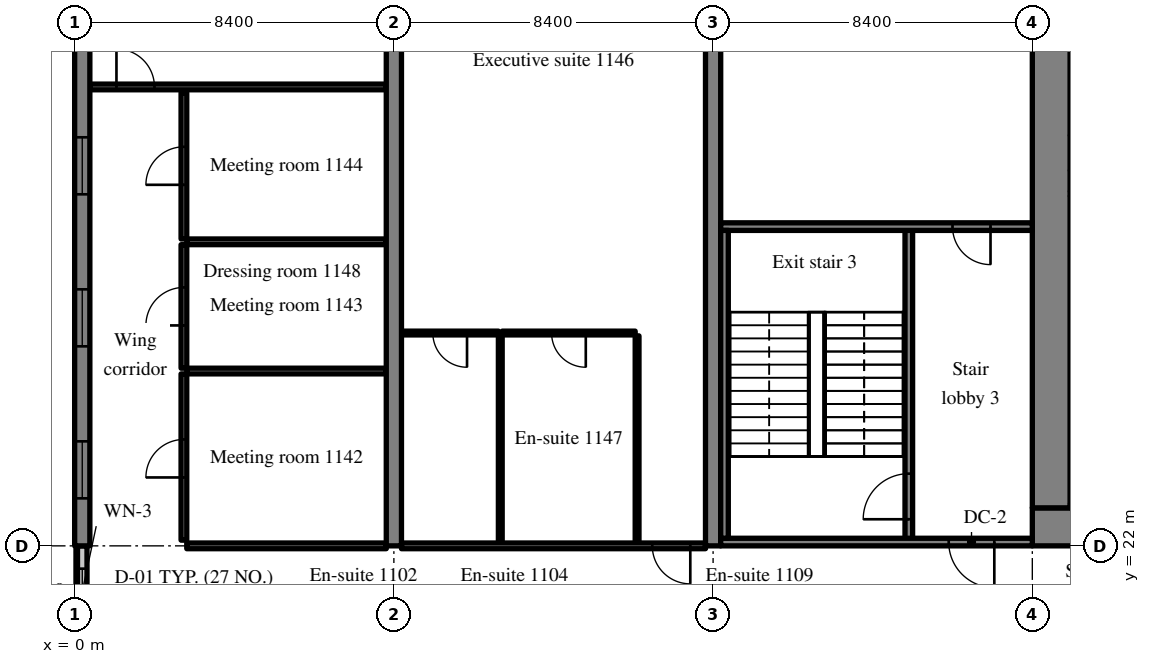
"""IFC4 building model, lengths in metres.
Left out: names, types, materials, properties, quantities, classifications, styles, units other than length and angle.
Written with IfcOpenShell. Run it as: python <this file> out.ifc"""

import sys

from ifc_helpers import new_model, si_unit, direction, frame, frame_2d, origin, place, context, subcontext, project, spatial, rectangle, extrude, source, transform, mapped, element, fill, save


model = new_model("IFC4")
c1 = context("Model", 3, precision=1e-05, world=origin(), true_north=direction((0.0, 1.0)))
c2 = subcontext(c1, "Body", "Model", "MODEL_VIEW")
j1 = project(units=[si_unit("LENGTHUNIT", "METRE"), si_unit("PLANEANGLEUNIT", "RADIAN")], contexts=[c1])
p1 = place(None, origin())
s1 = spatial("IfcSite", under=j1, at=p1, CompositionType="ELEMENT")
p2 = place(p1, origin())
s2 = spatial("IfcBuilding", under=s1, at=p2, CompositionType="ELEMENT")
p3 = place(p2, frame((0.0, 0.0, 50.6)))
s3 = spatial("IfcBuildingStorey", under=s2, at=p3, CompositionType="ELEMENT", Elevation=50.6)
m1 = source(origin(), c2, "Body", "SweptSolid", [
    extrude(rectangle(XDim=50.4, YDim=1.0, at=frame_2d((25.2, 0.0))), origin(), (0.0, 0.0, 1.0), 3.52),
])
p4 = place(p3, frame((25.2, 22.5, 0.0), z_axis=(0.0, 0.0, 1.0), x_axis=(1.0, 0.0, 0.0)))
e1 = element("IfcWall", 1, at=p4, inside=s3, PredefinedType="SHEAR", context=c2, shape_type="MappedRepresentation", body=[
    mapped(m1, transform((0.0, 0.0, 0.0), scale=1.0)),
])
m2 = source(origin(), c2, "Body", "SweptSolid", [
    extrude(rectangle(XDim=1.8, YDim=2.1, at=frame_2d((0.9, 1.05))), frame((0.0, 0.51, 0.0), z_axis=(0.0, -1.0, 0.0), x_axis=(1.0, 0.0, 0.0)), (0.0, 0.0, 1.0), 1.02),
])
p5 = place(p4, frame((15.9, 0.0, 0.0)))
e2 = element("IfcOpeningElement", 2, at=p5, cuts=e1, PredefinedType="OPENING", context=c2, shape_type="MappedRepresentation", body=[
    mapped(m2, transform((0.0, 0.0, 0.0), scale=1.0)),
])
m3 = source(origin(), c2, "Body", "SweptSolid", [
    extrude(rectangle(XDim=1.2, YDim=2.1, at=frame_2d((0.6, 1.05))), frame((0.0, 0.51, 0.0), z_axis=(0.0, -1.0, 0.0), x_axis=(1.0, 0.0, 0.0)), (0.0, 0.0, 1.0), 1.02),
])
p6 = place(p4, frame((26.987, 0.0, 0.0)))
e3 = element("IfcOpeningElement", 3, at=p6, cuts=e1, PredefinedType="OPENING", context=c2, shape_type="MappedRepresentation", body=[
    mapped(m3, transform((0.0, 0.0, 0.0), scale=1.0)),
])
m4 = source(origin(), c2, "Body", "SweptSolid", [
    extrude(rectangle(XDim=0.9, YDim=2.1, at=frame_2d((0.45, 1.05))), frame((0.0, 0.51, 0.0), z_axis=(0.0, -1.0, 0.0), x_axis=(1.0, 0.0, 0.0)), (0.0, 0.0, 1.0), 1.02),
])
p7 = place(p4, frame((33.75, 0.0, 0.0)))
e4 = element("IfcOpeningElement", 4, at=p7, cuts=e1, PredefinedType="OPENING", context=c2, shape_type="MappedRepresentation", body=[
    mapped(m4, transform((0.0, 0.0, 0.0), scale=1.0)),
])
p8 = place(p4, frame((30.75, 0.0, 0.0)))
e5 = element("IfcOpeningElement", 5, at=p8, cuts=e1, PredefinedType="OPENING", context=c2, shape_type="MappedRepresentation", body=[
    mapped(m4, transform((0.0, 0.0, 0.0), scale=1.0)),
])
p9 = place(p4, frame((38.262, 0.0, 0.0)))
e6 = element("IfcOpeningElement", 6, at=p9, cuts=e1, PredefinedType="OPENING", context=c2, shape_type="MappedRepresentation", body=[
    mapped(m4, transform((0.0, 0.0, 0.0), scale=1.0)),
])
p10 = place(p4, frame((6.438, 0.0, 0.0)))
e7 = element("IfcOpeningElement", 7, at=p10, cuts=e1, PredefinedType="OPENING", context=c2, shape_type="MappedRepresentation", body=[
    mapped(m3, transform((0.0, 0.0, 0.0), scale=1.0)),
])
p11 = place(p4, frame((47.725, 0.0, 0.0)))
e8 = element("IfcOpeningElement", 8, at=p11, cuts=e1, PredefinedType="OPENING", context=c2, shape_type="MappedRepresentation", body=[
    mapped(m3, transform((0.0, 0.0, 0.0), scale=1.0)),
])
m5 = source(origin(), c2, "Body", "SweptSolid", [
    extrude(rectangle(XDim=18.0, YDim=1.0, at=frame_2d((9.0, 0.0))), origin(), (0.0, 0.0, 1.0), 3.52),
])
p12 = place(p3, frame((25.7, 23.0, 0.0), z_axis=(0.0, 0.0, 1.0), x_axis=(0.0, 1.0, 0.0)))
e9 = element("IfcWall", 9, at=p12, inside=s3, PredefinedType="SHEAR", context=c2, shape_type="MappedRepresentation", body=[
    mapped(m5, transform((0.0, 0.0, 0.0), scale=1.0)),
])
m6 = source(origin(), c2, "Body", "SweptSolid", [
    extrude(rectangle(XDim=16.0, YDim=0.4, at=frame_2d((8.0, 0.0))), origin(), (0.0, 0.0, 1.0), 3.52),
])
p13 = place(p3, frame((0.2, 22.0, 0.0), z_axis=(0.0, 0.0, 1.0), x_axis=(0.0, 1.0, 0.0)))
e10 = element("IfcWall", 10, at=p13, inside=s3, PredefinedType="SHEAR", context=c2, shape_type="MappedRepresentation", body=[
    mapped(m6, transform((0.0, 0.0, 0.0), scale=1.0)),
])
m7 = source(origin(), c2, "Body", "SweptSolid", [
    extrude(rectangle(XDim=1.5, YDim=1.5, at=frame_2d((0.75, 0.75))), frame((0.0, 0.21, 0.0), z_axis=(0.0, -1.0, 0.0), x_axis=(1.0, 0.0, 0.0)), (0.0, 0.0, 1.0), 0.42),
])
p14 = place(p13, frame((1.25, 0.0, 0.9)))
e11 = element("IfcOpeningElement", 11, at=p14, cuts=e10, PredefinedType="OPENING", context=c2, shape_type="MappedRepresentation", body=[
    mapped(m7, transform((0.0, 0.0, 0.0), scale=1.0)),
])
p15 = place(p13, frame((5.25, 0.0, 0.9)))
e12 = element("IfcOpeningElement", 12, at=p15, cuts=e10, PredefinedType="OPENING", context=c2, shape_type="MappedRepresentation", body=[
    mapped(m7, transform((0.0, 0.0, 0.0), scale=1.0)),
])
p16 = place(p13, frame((9.25, 0.0, 0.9)))
e13 = element("IfcOpeningElement", 13, at=p16, cuts=e10, PredefinedType="OPENING", context=c2, shape_type="MappedRepresentation", body=[
    mapped(m7, transform((0.0, 0.0, 0.0), scale=1.0)),
])
p17 = place(p13, frame((13.25, 0.0, 0.9)))
e14 = element("IfcOpeningElement", 14, at=p17, cuts=e10, PredefinedType="OPENING", context=c2, shape_type="MappedRepresentation", body=[
    mapped(m7, transform((0.0, 0.0, 0.0), scale=1.0)),
])
m8 = source(origin(), c2, "Body", "SweptSolid", [
    extrude(rectangle(XDim=20.0, YDim=0.4, at=frame_2d((10.0, 0.0))), origin(), (0.0, 0.0, 1.0), 3.52),
])
for number, where, z_axis, x_axis in (
    (15, (8.4, 22.0, 0.0), (0.0, 0.0, 1.0), (0.0, 1.0, 0.0)),
    (16, (16.8, 22.0, 0.0), (0.0, 0.0, 1.0), (0.0, 1.0, 0.0)),
):
    element("IfcWall", number, at=place(p3, frame(where, z_axis=z_axis, x_axis=x_axis)), inside=s3, PredefinedType="SHEAR", context=c2, shape_type="MappedRepresentation", body=[
        mapped(m8, transform((0.0, 0.0, 0.0), scale=1.0)),
    ])
m9 = source(origin(), c2, "Body", "SweptSolid", [
    extrude(rectangle(XDim=2.4, YDim=0.25, at=frame_2d((1.2, 0.0))), origin(), (0.0, 0.0, 1.0), 2.62),
])
p18 = place(p3, frame((0.2, 19.6, 0.0), z_axis=(0.0, 0.0, 1.0), x_axis=(0.0, 1.0, 0.0)))
e17 = element("IfcWall", 17, at=p18, inside=s3, PredefinedType="SOLIDWALL", context=c2, shape_type="MappedRepresentation", body=[
    mapped(m9, transform((0.0, 0.0, 0.0), scale=1.0)),
])
m10 = source(origin(), c2, "Body", "SweptSolid", [
    extrude(rectangle(XDim=1.2, YDim=1.5, at=frame_2d((0.6, 0.75))), frame((0.0, 0.135, 0.0), z_axis=(0.0, -1.0, 0.0), x_axis=(1.0, 0.0, 0.0)), (0.0, 0.0, 1.0), 0.27),
])
p19 = place(p18, frame((0.6, 0.0, 0.9)))
e18 = element("IfcOpeningElement", 18, at=p19, cuts=e17, PredefinedType="OPENING", context=c2, shape_type="MappedRepresentation", body=[
    mapped(m10, transform((0.0, 0.0, 0.0), scale=1.0)),
])
m11 = source(origin(), c2, "Body", "SweptSolid", [
    extrude(rectangle(XDim=8.3, YDim=0.2, at=frame_2d((4.15, 0.0))), origin(), (0.0, 0.0, 1.0), 3.52),
])
p20 = place(p3, frame((21.95, 22.1, 0.0), z_axis=(0.0, 0.0, 1.0), x_axis=(0.0, 1.0, 0.0)))
e19 = element("IfcWall", 19, at=p20, inside=s3, PredefinedType="SOLIDWALL", context=c2, shape_type="MappedRepresentation", body=[
    mapped(m11, transform((0.0, 0.0, 0.0), scale=1.0)),
])
m12 = source(origin(), c2, "Body", "SweptSolid", [
    extrude(rectangle(XDim=1.2, YDim=2.1, at=frame_2d((0.6, 1.05))), frame((0.0, 0.11, 0.0), z_axis=(0.0, -1.0, 0.0), x_axis=(1.0, 0.0, 0.0)), (0.0, 0.0, 1.0), 0.22),
])
p21 = place(p20, frame((0.6, 0.0, 0.0)))
e20 = element("IfcOpeningElement", 20, at=p21, cuts=e19, PredefinedType="OPENING", context=c2, shape_type="MappedRepresentation", body=[
    mapped(m12, transform((0.0, 0.0, 0.0), scale=1.0)),
])
m13 = source(origin(), c2, "Body", "SweptSolid", [
    extrude(rectangle(XDim=8.2, YDim=0.2, at=frame_2d((4.1, 0.0))), origin(), (0.0, 0.0, 1.0), 3.52),
])
p22 = place(p3, frame((17.0, 22.1, 0.0), z_axis=(0.0, 0.0, 1.0), x_axis=(1.0, 0.0, 0.0)))
e21 = element("IfcWall", 21, at=p22, inside=s3, PredefinedType="SOLIDWALL", context=c2, shape_type="MappedRepresentation", body=[
    mapped(m13, transform((0.0, 0.0, 0.0), scale=1.0)),
])
p23 = place(p22, frame((6.0, 0.0, 0.0)))
e22 = element("IfcOpeningElement", 22, at=p23, cuts=e21, PredefinedType="OPENING", context=c2, shape_type="MappedRepresentation", body=[
    mapped(m12, transform((0.0, 0.0, 0.0), scale=1.0)),
])
p24 = place(p3, frame((17.0, 30.4, 0.0), z_axis=(0.0, 0.0, 1.0), x_axis=(1.0, 0.0, 0.0)))
e23 = element("IfcWall", 23, at=p24, inside=s3, PredefinedType="SOLIDWALL", context=c2, shape_type="MappedRepresentation", body=[
    mapped(m13, transform((0.0, 0.0, 0.0), scale=1.0)),
])
m14 = source(origin(), c2, "Body", "SweptSolid", [
    extrude(rectangle(XDim=1.0, YDim=2.1, at=frame_2d((0.5, 1.05))), frame((0.0, 0.11, 0.0), z_axis=(0.0, -1.0, 0.0), x_axis=(1.0, 0.0, 0.0)), (0.0, 0.0, 1.0), 0.22),
])
p25 = place(p24, frame((6.1, 0.0, 0.0)))
e24 = element("IfcOpeningElement", 24, at=p25, cuts=e23, PredefinedType="OPENING", context=c2, shape_type="MappedRepresentation", body=[
    mapped(m14, transform((0.0, 0.0, 0.0), scale=1.0)),
])
m15 = source(origin(), c2, "Body", "SweptSolid", [
    extrude(rectangle(XDim=8.1, YDim=0.2, at=frame_2d((4.05, 0.0))), origin(), (0.0, 0.0, 1.0), 3.52),
])
p26 = place(p3, frame((17.1, 22.2, 0.0), z_axis=(0.0, 0.0, 1.0), x_axis=(0.0, 1.0, 0.0)))
e25 = element("IfcWall", 25, at=p26, inside=s3, PredefinedType="SOLIDWALL", context=c2, shape_type="MappedRepresentation", body=[
    mapped(m15, transform((0.0, 0.0, 0.0), scale=1.0)),
])
m16 = source(origin(), c2, "Body", "SweptSolid", [
    extrude(rectangle(XDim=5.25, YDim=0.15, at=frame_2d((2.625, 0.0))), origin(), (0.0, 0.0, 1.0), 2.82),
])
p27 = place(p3, frame((2.95, 22.0, 0.0), z_axis=(0.0, 0.0, 1.0), x_axis=(1.0, 0.0, 0.0)))
e26 = element("IfcWall", 26, at=p27, inside=s3, PredefinedType="PARTITIONING", context=c2, shape_type="MappedRepresentation", body=[
    mapped(m16, transform((0.0, 0.0, 0.0), scale=1.0)),
])
m17 = source(origin(), c2, "Body", "SweptSolid", [
    extrude(rectangle(XDim=4.375, YDim=0.15, at=frame_2d((2.188, 0.0))), origin(), (0.0, 0.0, 1.0), 3.52),
])
p28 = place(p3, frame((2.875, 22.15, 0.0), z_axis=(0.0, 0.0, 1.0), x_axis=(0.0, 1.0, 0.0)))
e27 = element("IfcWall", 27, at=p28, inside=s3, PredefinedType="PARTITIONING", context=c2, shape_type="MappedRepresentation", body=[
    mapped(m17, transform((0.0, 0.0, 0.0), scale=1.0)),
])
m18 = source(origin(), c2, "Body", "SweptSolid", [
    extrude(rectangle(XDim=1.0, YDim=2.1, at=frame_2d((0.5, 1.05))), frame((0.0, 0.085, 0.0), z_axis=(0.0, -1.0, 0.0), x_axis=(1.0, 0.0, 0.0)), (0.0, 0.0, 1.0), 0.17),
])
p29 = place(p28, frame((1.65, 0.0, 0.0)))
e28 = element("IfcOpeningElement", 28, at=p29, cuts=e27, PredefinedType="OPENING", context=c2, shape_type="MappedRepresentation", body=[
    mapped(m18, transform((0.0, 0.0, 0.0), scale=1.0)),
])
m19 = source(origin(), c2, "Body", "SweptSolid", [
    extrude(rectangle(XDim=5.25, YDim=0.15, at=frame_2d((2.625, 0.0))), origin(), (0.0, 0.0, 1.0), 3.52),
])
p30 = place(p3, frame((2.95, 26.6, 0.0), z_axis=(0.0, 0.0, 1.0), x_axis=(1.0, 0.0, 0.0)))
e29 = element("IfcWall", 29, at=p30, inside=s3, PredefinedType="PARTITIONING", context=c2, shape_type="MappedRepresentation", body=[
    mapped(m19, transform((0.0, 0.0, 0.0), scale=1.0)),
])
m20 = source(origin(), c2, "Body", "SweptSolid", [
    extrude(rectangle(XDim=3.25, YDim=0.15, at=frame_2d((1.625, 0.0))), origin(), (0.0, 0.0, 1.0), 3.52),
])
p31 = place(p3, frame((2.875, 26.675, 0.0), z_axis=(0.0, 0.0, 1.0), x_axis=(0.0, 1.0, 0.0)))
e30 = element("IfcWall", 30, at=p31, inside=s3, PredefinedType="PARTITIONING", context=c2, shape_type="MappedRepresentation", body=[
    mapped(m20, transform((0.0, 0.0, 0.0), scale=1.0)),
])
p32 = place(p31, frame((1.125, 0.0, 0.0)))
e31 = element("IfcOpeningElement", 31, at=p32, cuts=e30, PredefinedType="OPENING", context=c2, shape_type="MappedRepresentation", body=[
    mapped(m18, transform((0.0, 0.0, 0.0), scale=1.0)),
])
p33 = place(p3, frame((2.95, 30.0, 0.0), z_axis=(0.0, 0.0, 1.0), x_axis=(1.0, 0.0, 0.0)))
e32 = element("IfcWall", 32, at=p33, inside=s3, PredefinedType="PARTITIONING", context=c2, shape_type="MappedRepresentation", body=[
    mapped(m19, transform((0.0, 0.0, 0.0), scale=1.0)),
])
m21 = source(origin(), c2, "Body", "SweptSolid", [
    extrude(rectangle(XDim=3.85, YDim=0.15, at=frame_2d((1.925, 0.0))), origin(), (0.0, 0.0, 1.0), 3.52),
])
p34 = place(p3, frame((2.875, 30.075, 0.0), z_axis=(0.0, 0.0, 1.0), x_axis=(0.0, 1.0, 0.0)))
e33 = element("IfcWall", 33, at=p34, inside=s3, PredefinedType="PARTITIONING", context=c2, shape_type="MappedRepresentation", body=[
    mapped(m21, transform((0.0, 0.0, 0.0), scale=1.0)),
])
p35 = place(p34, frame((1.425, 0.0, 0.0)))
e34 = element("IfcOpeningElement", 34, at=p35, cuts=e33, PredefinedType="OPENING", context=c2, shape_type="MappedRepresentation", body=[
    mapped(m18, transform((0.0, 0.0, 0.0), scale=1.0)),
])
m22 = source(origin(), c2, "Body", "SweptSolid", [
    extrude(rectangle(XDim=7.8, YDim=0.15, at=frame_2d((3.9, 0.0))), origin(), (0.0, 0.0, 1.0), 3.52),
])
p36 = place(p3, frame((0.4, 34.075, 0.0), z_axis=(0.0, 0.0, 1.0), x_axis=(1.0, 0.0, 0.0)))
e35 = element("IfcWall", 35, at=p36, inside=s3, PredefinedType="PARTITIONING", context=c2, shape_type="MappedRepresentation", body=[
    mapped(m22, transform((0.0, 0.0, 0.0), scale=1.0)),
])
p37 = place(p36, frame((0.7, 0.0, 0.0)))
e36 = element("IfcOpeningElement", 36, at=p37, cuts=e35, PredefinedType="OPENING", context=c2, shape_type="MappedRepresentation", body=[
    mapped(m18, transform((0.0, 0.0, 0.0), scale=1.0)),
])
m23 = source(origin(), c2, "Body", "SweptSolid", [
    extrude(rectangle(XDim=5.45, YDim=0.1, at=frame_2d((2.725, 0.0))), origin(), (0.0, 0.0, 1.0), 3.52),
])
for number, where, z_axis, x_axis in (
    (37, (14.8, 22.075, 0.0), (0.0, 0.0, 1.0), (0.0, 1.0, 0.0)),
    (38, (11.2, 22.075, 0.0), (0.0, 0.0, 1.0), (0.0, 1.0, 0.0)),
):
    element("IfcWall", number, at=place(p3, frame(where, z_axis=z_axis, x_axis=x_axis)), inside=s3, PredefinedType="PARTITIONING", context=c2, shape_type="MappedRepresentation", body=[
        mapped(m23, transform((0.0, 0.0, 0.0), scale=1.0)),
    ])
m24 = source(origin(), c2, "Body", "SweptSolid", [
    extrude(rectangle(XDim=3.5, YDim=0.1, at=frame_2d((1.75, 0.0))), origin(), (0.0, 0.0, 1.0), 3.52),
])
p38 = place(p3, frame((11.25, 27.6, 0.0), z_axis=(0.0, 0.0, 1.0), x_axis=(1.0, 0.0, 0.0)))
e39 = element("IfcWall", 39, at=p38, inside=s3, PredefinedType="PARTITIONING", context=c2, shape_type="MappedRepresentation", body=[
    mapped(m24, transform((0.0, 0.0, 0.0), scale=1.0)),
])
m25 = source(origin(), c2, "Body", "SweptSolid", [
    extrude(rectangle(XDim=0.9, YDim=2.1, at=frame_2d((0.45, 1.05))), frame((0.0, 0.06, 0.0), z_axis=(0.0, -1.0, 0.0), x_axis=(1.0, 0.0, 0.0)), (0.0, 0.0, 1.0), 0.12),
])
p39 = place(p38, frame((1.3, 0.0, 0.0)))
e40 = element("IfcOpeningElement", 40, at=p39, cuts=e39, PredefinedType="OPENING", context=c2, shape_type="MappedRepresentation", body=[
    mapped(m25, transform((0.0, 0.0, 0.0), scale=1.0)),
])
m26 = source(origin(), c2, "Body", "SweptSolid", [
    extrude(rectangle(XDim=2.55, YDim=0.1, at=frame_2d((1.275, 0.0))), origin(), (0.0, 0.0, 1.0), 3.52),
])
p40 = place(p3, frame((8.6, 27.6, 0.0), z_axis=(0.0, 0.0, 1.0), x_axis=(1.0, 0.0, 0.0)))
e41 = element("IfcWall", 41, at=p40, inside=s3, PredefinedType="PARTITIONING", context=c2, shape_type="MappedRepresentation", body=[
    mapped(m26, transform((0.0, 0.0, 0.0), scale=1.0)),
])
p41 = place(p40, frame((0.825, 0.0, 0.0)))
e42 = element("IfcOpeningElement", 42, at=p41, cuts=e41, PredefinedType="OPENING", context=c2, shape_type="MappedRepresentation", body=[
    mapped(m25, transform((0.0, 0.0, 0.0), scale=1.0)),
])
m27 = source(origin(), c2, "Body", "SweptSolid", [
    extrude(rectangle(XDim=8.0, YDim=0.15, at=frame_2d((4.0, 0.0))), origin(), (0.0, 0.0, 1.0), 2.82),
])
p42 = place(p3, frame((8.6, 22.0, 0.0), z_axis=(0.0, 0.0, 1.0), x_axis=(1.0, 0.0, 0.0)))
e43 = element("IfcWall", 43, at=p42, inside=s3, PredefinedType="PARTITIONING", context=c2, shape_type="MappedRepresentation", body=[
    mapped(m27, transform((0.0, 0.0, 0.0), scale=1.0)),
])
p43 = place(p42, frame((6.6, 0.0, 0.0)))
e44 = element("IfcOpeningElement", 44, at=p43, cuts=e43, PredefinedType="OPENING", context=c2, shape_type="MappedRepresentation", body=[
    mapped(m18, transform((0.0, 0.0, 0.0), scale=1.0)),
])
m28 = source(origin(), c2, "Body", "SweptSolid", [
    extrude(rectangle(XDim=1.5, YDim=1.5, at=frame_2d((0.75, 0.75))), frame((0.0, 0.03, 0.0), z_axis=(0.0, -1.0, 0.0), x_axis=(1.0, 0.0, 0.0)), (0.0, 0.0, 1.0), 0.06),
])
p44 = place(p14, origin())
e45 = element("IfcWindow", 45, at=p44, inside=s3, PartitioningType="SINGLE_PANEL", PredefinedType="WINDOW", context=c2, shape_type="MappedRepresentation", body=[
    mapped(m28, transform((0.0, 0.0, 0.0), scale=1.0)),
])
fill(e11, e45)
p45 = place(p15, origin())
e46 = element("IfcWindow", 46, at=p45, inside=s3, PartitioningType="SINGLE_PANEL", PredefinedType="WINDOW", context=c2, shape_type="MappedRepresentation", body=[
    mapped(m28, transform((0.0, 0.0, 0.0), scale=1.0)),
])
fill(e12, e46)
p46 = place(p16, origin())
e47 = element("IfcWindow", 47, at=p46, inside=s3, PartitioningType="SINGLE_PANEL", PredefinedType="WINDOW", context=c2, shape_type="MappedRepresentation", body=[
    mapped(m28, transform((0.0, 0.0, 0.0), scale=1.0)),
])
fill(e13, e47)
m29 = source(origin(), c2, "Body", "SweptSolid", [
    extrude(rectangle(XDim=1.2, YDim=1.5, at=frame_2d((0.6, 0.75))), frame((0.0, 0.03, 0.0), z_axis=(0.0, -1.0, 0.0), x_axis=(1.0, 0.0, 0.0)), (0.0, 0.0, 1.0), 0.06),
])
p47 = place(p19, origin())
e48 = element("IfcWindow", 48, at=p47, inside=s3, PartitioningType="SINGLE_PANEL", PredefinedType="WINDOW", context=c2, shape_type="MappedRepresentation", body=[
    mapped(m29, transform((0.0, 0.0, 0.0), scale=1.0)),
])
fill(e18, e48)
m30 = source(origin(), c2, "Body", "SweptSolid", [
    extrude(rectangle(XDim=1.2, YDim=2.1, at=frame_2d((0.6, 1.05))), frame((0.0, 0.025, 0.0), z_axis=(0.0, -1.0, 0.0), x_axis=(1.0, 0.0, 0.0)), (0.0, 0.0, 1.0), 0.05),
])
p48 = place(p21, origin())
e49 = element("IfcDoor", 49, at=p48, inside=s3, OperationType="SINGLE_SWING_LEFT", PredefinedType="DOOR", context=c2, shape_type="MappedRepresentation", body=[
    mapped(m30, transform((0.0, 0.0, 0.0), scale=1.0)),
])
fill(e20, e49)
p49 = place(p23, origin())
e50 = element("IfcDoor", 50, at=p49, inside=s3, OperationType="SINGLE_SWING_RIGHT", PredefinedType="DOOR", context=c2, shape_type="MappedRepresentation", body=[
    mapped(m30, transform((0.0, 0.0, 0.0), scale=1.0)),
])
fill(e22, e50)
m31 = source(origin(), c2, "Body", "SweptSolid", [
    extrude(rectangle(XDim=1.0, YDim=2.1, at=frame_2d((0.5, 1.05))), frame((0.0, 0.025, 0.0), z_axis=(0.0, -1.0, 0.0), x_axis=(1.0, 0.0, 0.0)), (0.0, 0.0, 1.0), 0.05),
])
p50 = place(p25, origin())
e51 = element("IfcDoor", 51, at=p50, inside=s3, OperationType="SINGLE_SWING_RIGHT", PredefinedType="DOOR", context=c2, shape_type="MappedRepresentation", body=[
    mapped(m31, transform((0.0, 0.0, 0.0), scale=1.0)),
])
fill(e24, e51)
p51 = place(p29, origin())
e52 = element("IfcDoor", 52, at=p51, inside=s3, OperationType="SINGLE_SWING_LEFT", PredefinedType="DOOR", context=c2, shape_type="MappedRepresentation", body=[
    mapped(m31, transform((0.0, 0.0, 0.0), scale=1.0)),
])
fill(e28, e52)
p52 = place(p32, origin())
e53 = element("IfcDoor", 53, at=p52, inside=s3, OperationType="SINGLE_SWING_LEFT", PredefinedType="DOOR", context=c2, shape_type="MappedRepresentation", body=[
    mapped(m31, transform((0.0, 0.0, 0.0), scale=1.0)),
])
fill(e31, e53)
p53 = place(p35, origin())
e54 = element("IfcDoor", 54, at=p53, inside=s3, OperationType="SINGLE_SWING_LEFT", PredefinedType="DOOR", context=c2, shape_type="MappedRepresentation", body=[
    mapped(m31, transform((0.0, 0.0, 0.0), scale=1.0)),
])
fill(e34, e54)
p54 = place(p37, origin())
e55 = element("IfcDoor", 55, at=p54, inside=s3, OperationType="SINGLE_SWING_LEFT", PredefinedType="DOOR", context=c2, shape_type="MappedRepresentation", body=[
    mapped(m31, transform((0.0, 0.0, 0.0), scale=1.0)),
])
fill(e36, e55)
m32 = source(origin(), c2, "Body", "SweptSolid", [
    extrude(rectangle(XDim=0.9, YDim=2.1, at=frame_2d((0.45, 1.05))), frame((0.0, 0.025, 0.0), z_axis=(0.0, -1.0, 0.0), x_axis=(1.0, 0.0, 0.0)), (0.0, 0.0, 1.0), 0.05),
])
p55 = place(p39, origin())
e56 = element("IfcDoor", 56, at=p55, inside=s3, OperationType="SINGLE_SWING_RIGHT", PredefinedType="DOOR", context=c2, shape_type="MappedRepresentation", body=[
    mapped(m32, transform((0.0, 0.0, 0.0), scale=1.0)),
])
fill(e40, e56)
p56 = place(p41, origin())
e57 = element("IfcDoor", 57, at=p56, inside=s3, OperationType="SINGLE_SWING_RIGHT", PredefinedType="DOOR", context=c2, shape_type="MappedRepresentation", body=[
    mapped(m32, transform((0.0, 0.0, 0.0), scale=1.0)),
])
fill(e42, e57)
p57 = place(p43, origin())
e58 = element("IfcDoor", 58, at=p57, inside=s3, OperationType="SINGLE_SWING_RIGHT", PredefinedType="DOOR", context=c2, shape_type="MappedRepresentation", body=[
    mapped(m31, transform((0.0, 0.0, 0.0), scale=1.0)),
])
fill(e44, e58)
save(model, sys.argv[1])
